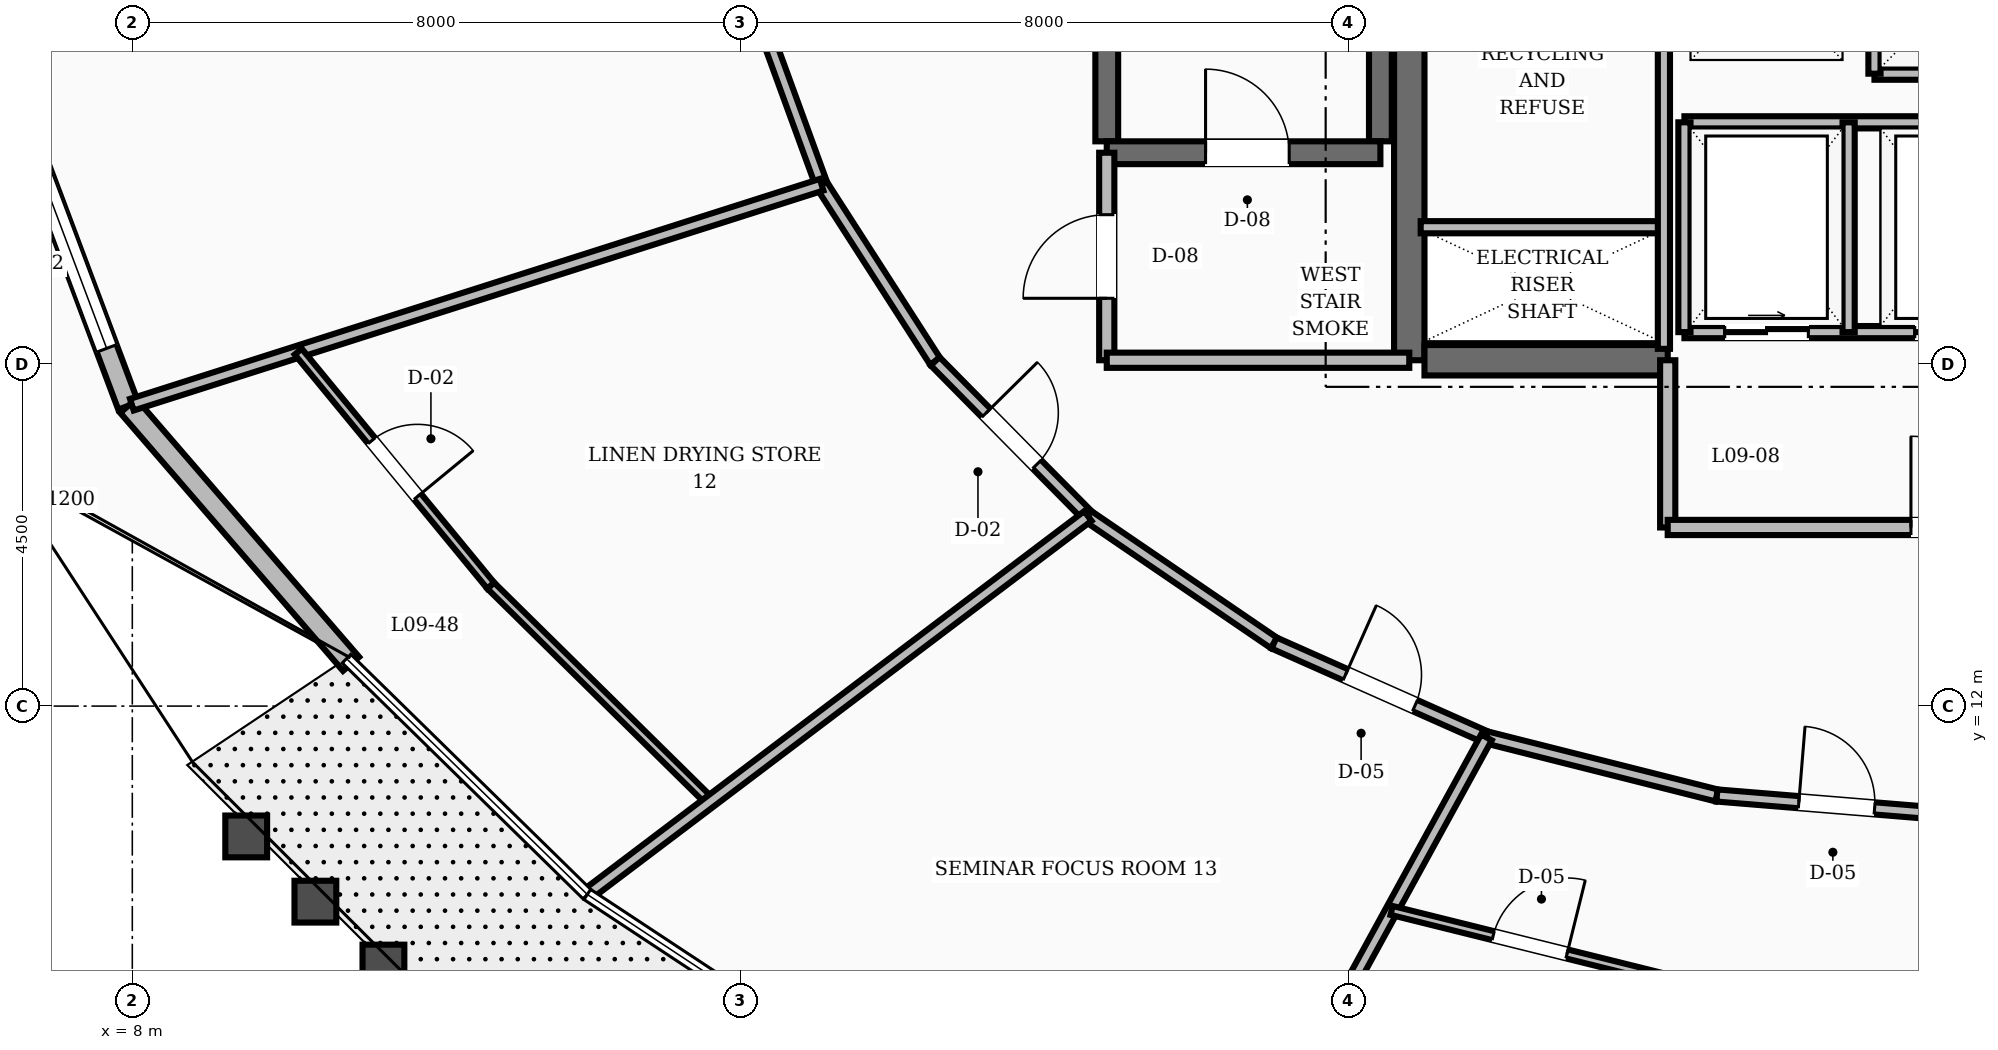
"""IFC4 building model, lengths in metres.
Left out: names, types, materials, properties, quantities, classifications, styles, units other than length and angle.
Written with IfcOpenShell. Run it as: python <this file> out.ifc"""

import sys

from ifc_helpers import new_model, si_unit, direction, frame, frame_2d, origin, place, context, subcontext, project, spatial, rectangle, extrude, element, fill, save


model = new_model("IFC4")
c1 = context("Model", 3, precision=1e-05, world=origin(), true_north=direction((0.0, 1.0)))
c2 = subcontext(c1, "Body", "Model", "MODEL_VIEW")
j1 = project(units=[si_unit("LENGTHUNIT", "METRE"), si_unit("PLANEANGLEUNIT", "RADIAN")], contexts=[c1])
p1 = place(None, origin())
s1 = spatial("IfcSite", under=j1, at=p1, CompositionType="ELEMENT")
p2 = place(p1, origin())
s2 = spatial("IfcBuilding", under=s1, at=p2, CompositionType="ELEMENT")
p3 = place(p2, frame((0.0, 0.0, 41.2)))
s3 = spatial("IfcBuildingStorey", under=s2, at=p3, CompositionType="ELEMENT", Elevation=41.2)
p4 = place(p3, frame((24.8, 16.55, 0.0), z_axis=(0.0, 0.0, 1.0), x_axis=(0.0, 1.0, 0.0)))
e1 = element("IfcWall", 1, at=p4, inside=s3, PredefinedType="SHEAR", context=c2, shape_type="SweptSolid", body=[
    extrude(rectangle(XDim=6.3, YDim=0.4, at=frame_2d((3.15, 0.0))), origin(), (0.0, 0.0, 1.0), 3.6),
])
p5 = place(p3, frame((25.0, 16.55, 0.0), z_axis=(0.0, 0.0, 1.0), x_axis=(1.0, 0.0, 0.0)))
e2 = element("IfcWall", 2, at=p5, inside=s3, PredefinedType="SHEAR", context=c2, shape_type="SweptSolid", body=[
    extrude(rectangle(XDim=3.2, YDim=0.4, at=frame_2d((1.6, 0.0))), origin(), (0.0, 0.0, 1.0), 3.6),
])
for number, where, z_axis, x_axis in (
    (3, (20.82, 19.43, 0.0), (0.0, 0.0, 1.0), (0.0, 1.0, 0.0)),
    (4, (24.42, 19.43, 0.0), (0.0, 0.0, 1.0), (0.0, 1.0, 0.0)),
):
    element("IfcWall", number, at=place(p3, frame(where, z_axis=z_axis, x_axis=x_axis)), inside=s3, PredefinedType="SHEAR", context=c2, shape_type="SweptSolid", body=[
        extrude(rectangle(XDim=8.74, YDim=0.3, at=frame_2d((4.37, 0.0))), origin(), (0.0, 0.0, 1.0), 3.6),
    ])
p6 = place(p3, frame((20.82, 19.28, 0.0), z_axis=(0.0, 0.0, 1.0), x_axis=(1.0, 0.0, 0.0)))
e5 = element("IfcWall", 5, at=p6, inside=s3, PredefinedType="SHEAR", context=c2, shape_type="SweptSolid", body=[
    extrude(rectangle(XDim=3.6, YDim=0.3, at=frame_2d((1.8, 0.0))), origin(), (0.0, 0.0, 1.0), 3.6),
])
p7 = place(p6, frame((1.3, 0.0, 0.0)))
e6 = element("IfcOpeningElement", 6, at=p7, cuts=e5, PredefinedType="OPENING", context=c2, shape_type="SweptSolid", body=[
    extrude(rectangle(XDim=1.1, YDim=2.1, at=frame_2d((0.55, 1.05))), frame((0.0, 0.16, 0.0), z_axis=(0.0, -1.0, 0.0), x_axis=(1.0, 0.0, 0.0)), (0.0, 0.0, 1.0), 0.32),
])
p8 = place(p3, frame((6.465, 19.896, 0.0), z_axis=(0.0, 0.0, 1.0), x_axis=(0.351472537915, -0.936198192207, 0.0)))
e7 = element("IfcWall", 7, at=p8, inside=s3, PredefinedType="STANDARD", context=c2, shape_type="SweptSolid", body=[
    extrude(rectangle(XDim=4.215, YDim=0.28, at=frame_2d((2.107, 0.0))), origin(), (0.0, 0.0, 1.0), 2.65),
])
p9 = place(p8, frame((0.808, 0.0, 0.8)))
e8 = element("IfcOpeningElement", 8, at=p9, cuts=e7, PredefinedType="OPENING", context=c2, shape_type="SweptSolid", body=[
    extrude(rectangle(XDim=2.6, YDim=1.65, at=frame_2d((1.3, 0.825))), frame((0.0, 0.15, 0.0), z_axis=(0.0, -1.0, 0.0), x_axis=(1.0, 0.0, 0.0)), (0.0, 0.0, 1.0), 0.3),
])
p10 = place(p3, frame((7.946, 15.95, 0.0), z_axis=(0.0, 0.0, 1.0), x_axis=(0.653570276047, -0.756865836372, 0.0)))
e9 = element("IfcWall", 9, at=p10, inside=s3, PredefinedType="STANDARD", context=c2, shape_type="SweptSolid", body=[
    extrude(rectangle(XDim=4.486, YDim=0.28, at=frame_2d((2.243, 0.0))), origin(), (0.0, 0.0, 1.0), 2.65),
])
p11 = place(p3, frame((20.82, 16.55, 0.0), z_axis=(0.0, 0.0, 1.0), x_axis=(0.0, 1.0, 0.0)))
e10 = element("IfcWall", 10, at=p11, inside=s3, PredefinedType="SOLIDWALL", context=c2, shape_type="SweptSolid", body=[
    extrude(rectangle(XDim=2.73, YDim=0.2, at=frame_2d((1.365, 0.0))), origin(), (0.0, 0.0, 1.0), 2.61),
])
p12 = place(p11, frame((0.815, 0.0, 0.0)))
e11 = element("IfcOpeningElement", 11, at=p12, cuts=e10, PredefinedType="OPENING", context=c2, shape_type="SweptSolid", body=[
    extrude(rectangle(XDim=1.1, YDim=2.1, at=frame_2d((0.55, 1.05))), frame((0.0, 0.11, 0.0), z_axis=(0.0, -1.0, 0.0), x_axis=(1.0, 0.0, 0.0)), (0.0, 0.0, 1.0), 0.22),
])
p13 = place(p3, frame((20.82, 16.55, 0.0), z_axis=(0.0, 0.0, 1.0), x_axis=(1.0, 0.0, 0.0)))
e12 = element("IfcWall", 12, at=p13, inside=s3, PredefinedType="SOLIDWALL", context=c2, shape_type="SweptSolid", body=[
    extrude(rectangle(XDim=3.98, YDim=0.2, at=frame_2d((1.99, 0.0))), origin(), (0.0, 0.0, 1.0), 2.61),
])
p14 = place(p3, frame((28.2, 14.35, 0.0), z_axis=(0.0, 0.0, 1.0), x_axis=(0.0, 1.0, 0.0)))
e13 = element("IfcWall", 13, at=p14, inside=s3, PredefinedType="SOLIDWALL", context=c2, shape_type="SweptSolid", body=[
    extrude(rectangle(XDim=2.2, YDim=0.2, at=frame_2d((1.1, 0.0))), origin(), (0.0, 0.0, 1.0), 2.61),
])
p15 = place(p3, frame((28.2, 14.35, 0.0), z_axis=(0.0, 0.0, 1.0), x_axis=(1.0, 0.0, 0.0)))
e14 = element("IfcWall", 14, at=p15, inside=s3, PredefinedType="SOLIDWALL", context=c2, shape_type="SweptSolid", body=[
    extrude(rectangle(XDim=7.6, YDim=0.2, at=frame_2d((3.8, 0.0))), origin(), (0.0, 0.0, 1.0), 2.61),
])
p16 = place(p15, frame((3.2, 0.0, 0.0)))
e15 = element("IfcOpeningElement", 15, at=p16, cuts=e14, PredefinedType="OPENING", context=c2, shape_type="SweptSolid", body=[
    extrude(rectangle(XDim=1.2, YDim=2.1, at=frame_2d((0.6, 1.05))), frame((0.0, 0.11, 0.0), z_axis=(0.0, -1.0, 0.0), x_axis=(1.0, 0.0, 0.0)), (0.0, 0.0, 1.0), 0.22),
])
p17 = place(p3, frame((30.92, 20.32, 0.0), z_axis=(0.0, 0.0, 1.0), x_axis=(1.0, 0.0, 0.0)))
e16 = element("IfcWall", 16, at=p17, inside=s3, PredefinedType="SOLIDWALL", context=c2, shape_type="SweptSolid", body=[
    extrude(rectangle(XDim=4.76, YDim=0.16, at=frame_2d((2.38, 0.0))), origin(), (0.0, 0.0, 1.0), 2.61),
])
p18 = place(p3, frame((30.92, 20.32, 0.0), z_axis=(0.0, 0.0, 1.0), x_axis=(0.0, 1.0, 0.0)))
e17 = element("IfcWall", 17, at=p18, inside=s3, PredefinedType="SOLIDWALL", context=c2, shape_type="SweptSolid", body=[
    extrude(rectangle(XDim=2.36, YDim=0.16, at=frame_2d((1.18, 0.0))), origin(), (0.0, 0.0, 1.0), 2.61),
])
p19 = place(p3, frame((28.42, 16.92, 0.0), z_axis=(0.0, 0.0, 1.0), x_axis=(1.0, 0.0, 0.0)))
e18 = element("IfcWall", 18, at=p19, inside=s3, PredefinedType="SOLIDWALL", context=c2, shape_type="SweptSolid", body=[
    extrude(rectangle(XDim=7.16, YDim=0.16, at=frame_2d((3.58, 0.0))), origin(), (0.0, 0.0, 1.0), 2.61),
])
p20 = place(p19, frame((0.53, 0.0, 0.0)))
e19 = element("IfcOpeningElement", 19, at=p20, cuts=e18, PredefinedType="OPENING", context=c2, shape_type="SweptSolid", body=[
    extrude(rectangle(XDim=1.1, YDim=2.15, at=frame_2d((0.55, 1.075))), frame((0.0, 0.09, 0.0), z_axis=(0.0, -1.0, 0.0), x_axis=(1.0, 0.0, 0.0)), (0.0, 0.0, 1.0), 0.18),
])
p21 = place(p19, frame((3.03, 0.0, 0.0)))
e20 = element("IfcOpeningElement", 20, at=p21, cuts=e18, PredefinedType="OPENING", context=c2, shape_type="SweptSolid", body=[
    extrude(rectangle(XDim=1.1, YDim=2.15, at=frame_2d((0.55, 1.075))), frame((0.0, 0.09, 0.0), z_axis=(0.0, -1.0, 0.0), x_axis=(1.0, 0.0, 0.0)), (0.0, 0.0, 1.0), 0.18),
])
p22 = place(p19, frame((5.53, 0.0, 0.0)))
e21 = element("IfcOpeningElement", 21, at=p22, cuts=e18, PredefinedType="OPENING", context=c2, shape_type="SweptSolid", body=[
    extrude(rectangle(XDim=1.1, YDim=2.15, at=frame_2d((0.55, 1.075))), frame((0.0, 0.09, 0.0), z_axis=(0.0, -1.0, 0.0), x_axis=(1.0, 0.0, 0.0)), (0.0, 0.0, 1.0), 0.18),
])
p23 = place(p3, frame((28.42, 19.68, 0.0), z_axis=(0.0, 0.0, 1.0), x_axis=(1.0, 0.0, 0.0)))
e22 = element("IfcWall", 22, at=p23, inside=s3, PredefinedType="SOLIDWALL", context=c2, shape_type="SweptSolid", body=[
    extrude(rectangle(XDim=7.16, YDim=0.16, at=frame_2d((3.58, 0.0))), origin(), (0.0, 0.0, 1.0), 2.61),
])
for number, where, z_axis, x_axis in (
    (23, (28.42, 16.92, 0.0), (0.0, 0.0, 1.0), (0.0, 1.0, 0.0)),
    (24, (30.58, 16.92, 0.0), (0.0, 0.0, 1.0), (0.0, 1.0, 0.0)),
):
    element("IfcWall", number, at=place(p3, frame(where, z_axis=z_axis, x_axis=x_axis)), inside=s3, PredefinedType="SOLIDWALL", context=c2, shape_type="SweptSolid", body=[
        extrude(rectangle(XDim=2.76, YDim=0.16, at=frame_2d((1.38, 0.0))), origin(), (0.0, 0.0, 1.0), 2.61),
    ])
p24 = place(p3, frame((24.95, 18.3, 0.0), z_axis=(0.0, 0.0, 1.0), x_axis=(1.0, 0.0, 0.0)))
e25 = element("IfcWall", 25, at=p24, inside=s3, PredefinedType="SOLIDWALL", context=c2, shape_type="SweptSolid", body=[
    extrude(rectangle(XDim=3.2, YDim=0.16, at=frame_2d((1.6, 0.0))), origin(), (0.0, 0.0, 1.0), 2.61),
])
p25 = place(p3, frame((28.15, 16.7, 0.0), z_axis=(0.0, 0.0, 1.0), x_axis=(0.0, 1.0, 0.0)))
e26 = element("IfcWall", 26, at=p25, inside=s3, PredefinedType="SOLIDWALL", context=c2, shape_type="SweptSolid", body=[
    extrude(rectangle(XDim=6.05, YDim=0.16, at=frame_2d((3.025, 0.0))), origin(), (0.0, 0.0, 1.0), 2.61),
])
p26 = place(p3, frame((16.148, 21.379, 0.0), z_axis=(0.0, 0.0, 1.0), x_axis=(0.342882618672, -0.939378257047, 0.0)))
e27 = element("IfcWall", 27, at=p26, inside=s3, PredefinedType="SOLIDWALL", context=c2, shape_type="SweptSolid", body=[
    extrude(rectangle(XDim=2.683, YDim=0.16, at=frame_2d((1.341, 0.0))), origin(), (0.0, 0.0, 1.0), 2.61),
])
p27 = place(p3, frame((17.068, 18.859, 0.0), z_axis=(0.0, 0.0, 1.0), x_axis=(0.540891657444, -0.841092274907, 0.0)))
e28 = element("IfcWall", 28, at=p27, inside=s3, PredefinedType="SOLIDWALL", context=c2, shape_type="SweptSolid", body=[
    extrude(rectangle(XDim=2.761, YDim=0.16, at=frame_2d((1.38, 0.0))), origin(), (0.0, 0.0, 1.0), 2.61),
])
p28 = place(p3, frame((18.562, 16.537, 0.0), z_axis=(0.0, 0.0, 1.0), x_axis=(0.702569520063, -0.711615113301, 0.0)))
e29 = element("IfcWall", 29, at=p28, inside=s3, PredefinedType="SOLIDWALL", context=c2, shape_type="SweptSolid", body=[
    extrude(rectangle(XDim=2.861, YDim=0.16, at=frame_2d((1.43, 0.0))), origin(), (0.0, 0.0, 1.0), 2.61),
])
p29 = place(p28, frame((0.955, 0.0, 0.0)))
e30 = element("IfcOpeningElement", 30, at=p29, cuts=e29, PredefinedType="OPENING", context=c2, shape_type="SweptSolid", body=[
    extrude(rectangle(XDim=0.95, YDim=2.1, at=frame_2d((0.475, 1.05))), frame((0.0, 0.09, 0.0), z_axis=(0.0, -1.0, 0.0), x_axis=(1.0, 0.0, 0.0)), (0.0, 0.0, 1.0), 0.18),
])
p30 = place(p3, frame((20.572, 14.501, 0.0), z_axis=(0.0, 0.0, 1.0), x_axis=(0.826112340767, -0.563505457323, 0.0)))
e31 = element("IfcWall", 31, at=p30, inside=s3, PredefinedType="SOLIDWALL", context=c2, shape_type="SweptSolid", body=[
    extrude(rectangle(XDim=2.965, YDim=0.16, at=frame_2d((1.482, 0.0))), origin(), (0.0, 0.0, 1.0), 2.61),
])
p31 = place(p3, frame((23.021, 12.83, 0.0), z_axis=(0.0, 0.0, 1.0), x_axis=(0.913860932409, -0.406027334321, 0.0)))
e32 = element("IfcWall", 32, at=p31, inside=s3, PredefinedType="SOLIDWALL", context=c2, shape_type="SweptSolid", body=[
    extrude(rectangle(XDim=3.058, YDim=0.16, at=frame_2d((1.529, 0.0))), origin(), (0.0, 0.0, 1.0), 2.61),
])
p32 = place(p31, frame((1.029, 0.0, 0.0)))
e33 = element("IfcOpeningElement", 33, at=p32, cuts=e32, PredefinedType="OPENING", context=c2, shape_type="SweptSolid", body=[
    extrude(rectangle(XDim=1.0, YDim=2.1, at=frame_2d((0.5, 1.05))), frame((0.0, 0.09, 0.0), z_axis=(0.0, -1.0, 0.0), x_axis=(1.0, 0.0, 0.0)), (0.0, 0.0, 1.0), 0.18),
])
p33 = place(p3, frame((25.815, 11.589, 0.0), z_axis=(0.0, 0.0, 1.0), x_axis=(0.969653665365, -0.244482656326, 0.0)))
e34 = element("IfcWall", 34, at=p33, inside=s3, PredefinedType="SOLIDWALL", context=c2, shape_type="SweptSolid", body=[
    extrude(rectangle(XDim=3.127, YDim=0.16, at=frame_2d((1.563, 0.0))), origin(), (0.0, 0.0, 1.0), 2.61),
])
p34 = place(p3, frame((28.847, 10.824, 0.0), z_axis=(0.0, 0.0, 1.0), x_axis=(0.996661331307, -0.081646743207, 0.0)))
e35 = element("IfcWall", 35, at=p34, inside=s3, PredefinedType="SOLIDWALL", context=c2, shape_type="SweptSolid", body=[
    extrude(rectangle(XDim=3.164, YDim=0.16, at=frame_2d((1.582, 0.0))), origin(), (0.0, 0.0, 1.0), 2.61),
])
p35 = place(p34, frame((1.082, 0.0, 0.0)))
e36 = element("IfcOpeningElement", 36, at=p35, cuts=e35, PredefinedType="OPENING", context=c2, shape_type="SweptSolid", body=[
    extrude(rectangle(XDim=1.0, YDim=2.1, at=frame_2d((0.5, 1.05))), frame((0.0, 0.09, 0.0), z_axis=(0.0, -1.0, 0.0), x_axis=(1.0, 0.0, 0.0)), (0.0, 0.0, 1.0), 0.18),
])
p36 = place(p3, frame((25.815, 11.589, 0.0), z_axis=(0.0, 0.0, 1.0), x_axis=(-0.48051126166, -0.876988556036, 0.0)))
e37 = element("IfcWall", 37, at=p36, inside=s3, PredefinedType="SOLIDWALL", context=c2, shape_type="SweptSolid", body=[
    extrude(rectangle(XDim=7.368, YDim=0.16, at=frame_2d((3.684, 0.0))), origin(), (0.0, 0.0, 1.0), 2.61),
])
p37 = place(p3, frame((24.568, 9.312, 0.0), z_axis=(0.0, 0.0, 1.0), x_axis=(0.970523829208, -0.241005180317, 0.0)))
e38 = element("IfcWall", 38, at=p37, inside=s3, PredefinedType="PARTITIONING", context=c2, shape_type="SweptSolid", body=[
    extrude(rectangle(XDim=3.754, YDim=0.12, at=frame_2d((1.877, 0.0))), origin(), (0.0, 0.0, 1.0), 2.61),
])
p38 = place(p37, frame((1.377, 0.0, 0.0)))
e39 = element("IfcOpeningElement", 39, at=p38, cuts=e38, PredefinedType="OPENING", context=c2, shape_type="SweptSolid", body=[
    extrude(rectangle(XDim=1.0, YDim=2.1, at=frame_2d((0.5, 1.05))), frame((0.0, 0.07, 0.0), z_axis=(0.0, -1.0, 0.0), x_axis=(1.0, 0.0, 0.0)), (0.0, 0.0, 1.0), 0.14),
])
p39 = place(p3, frame((17.068, 18.859, 0.0), z_axis=(0.0, 0.0, 1.0), x_axis=(-0.952736741366, -0.303797138978, 0.0)))
e40 = element("IfcWall", 40, at=p39, inside=s3, PredefinedType="SOLIDWALL", context=c2, shape_type="SweptSolid", body=[
    extrude(rectangle(XDim=9.525, YDim=0.16, at=frame_2d((4.762, 0.0))), origin(), (0.0, 0.0, 1.0), 2.61),
])
p40 = place(p3, frame((10.183, 16.663, 0.0), z_axis=(0.0, 0.0, 1.0), x_axis=(0.635342385708, -0.772230569793, 0.0)))
e41 = element("IfcWall", 41, at=p40, inside=s3, PredefinedType="PARTITIONING", context=c2, shape_type="SweptSolid", body=[
    extrude(rectangle(XDim=3.988, YDim=0.12, at=frame_2d((1.994, 0.0))), origin(), (0.0, 0.0, 1.0), 2.61),
])
p41 = place(p40, frame((1.519, 0.0, 0.0)))
e42 = element("IfcOpeningElement", 42, at=p41, cuts=e41, PredefinedType="OPENING", context=c2, shape_type="SweptSolid", body=[
    extrude(rectangle(XDim=0.95, YDim=2.1, at=frame_2d((0.475, 1.05))), frame((0.0, 0.07, 0.0), z_axis=(0.0, -1.0, 0.0), x_axis=(1.0, 0.0, 0.0)), (0.0, 0.0, 1.0), 0.14),
])
p42 = place(p3, frame((12.717, 13.584, 0.0), z_axis=(0.0, 0.0, 1.0), x_axis=(0.712363638045, -0.701810549358, 0.0)))
e43 = element("IfcWall", 43, at=p42, inside=s3, PredefinedType="PARTITIONING", context=c2, shape_type="SweptSolid", body=[
    extrude(rectangle(XDim=4.049, YDim=0.12, at=frame_2d((2.024, 0.0))), origin(), (0.0, 0.0, 1.0), 2.61),
])
p43 = place(p3, frame((20.572, 14.501, 0.0), z_axis=(0.0, 0.0, 1.0), x_axis=(-0.797684116535, -0.603075492976, 0.0)))
e44 = element("IfcWall", 44, at=p43, inside=s3, PredefinedType="SOLIDWALL", context=c2, shape_type="SweptSolid", body=[
    extrude(rectangle(XDim=8.206, YDim=0.16, at=frame_2d((4.103, 0.0))), origin(), (0.0, 0.0, 1.0), 2.61),
])
p44 = place(p9, origin())
e45 = element("IfcWindow", 45, at=p44, inside=s3, PartitioningType="SINGLE_PANEL", PredefinedType="WINDOW", context=c2, shape_type="SweptSolid", body=[
    extrude(rectangle(XDim=2.6, YDim=1.65, at=frame_2d((1.3, 0.825))), frame((0.0, 0.03, 0.0), z_axis=(0.0, -1.0, 0.0), x_axis=(1.0, 0.0, 0.0)), (0.0, 0.0, 1.0), 0.06),
])
fill(e8, e45)
p45 = place(p7, origin())
e46 = element("IfcDoor", 46, at=p45, inside=s3, OperationType="SINGLE_SWING_LEFT", PredefinedType="DOOR", context=c2, shape_type="SweptSolid", body=[
    extrude(rectangle(XDim=1.1, YDim=2.1, at=frame_2d((0.55, 1.05))), frame((0.0, 0.025, 0.0), z_axis=(0.0, -1.0, 0.0), x_axis=(1.0, 0.0, 0.0)), (0.0, 0.0, 1.0), 0.05),
])
fill(e6, e46)
p46 = place(p12, origin())
e47 = element("IfcDoor", 47, at=p46, inside=s3, OperationType="SINGLE_SWING_LEFT", PredefinedType="DOOR", context=c2, shape_type="SweptSolid", body=[
    extrude(rectangle(XDim=1.1, YDim=2.1, at=frame_2d((0.55, 1.05))), frame((0.0, 0.025, 0.0), z_axis=(0.0, -1.0, 0.0), x_axis=(1.0, 0.0, 0.0)), (0.0, 0.0, 1.0), 0.05),
])
fill(e11, e47)
p47 = place(p16, origin())
e48 = element("IfcDoor", 48, at=p47, inside=s3, OperationType="SINGLE_SWING_LEFT", PredefinedType="DOOR", context=c2, shape_type="SweptSolid", body=[
    extrude(rectangle(XDim=1.2, YDim=2.1, at=frame_2d((0.6, 1.05))), frame((0.0, 0.025, 0.0), z_axis=(0.0, -1.0, 0.0), x_axis=(1.0, 0.0, 0.0)), (0.0, 0.0, 1.0), 0.05),
])
fill(e15, e48)
p48 = place(p20, origin())
e49 = element("IfcDoor", 49, at=p48, inside=s3, OperationType="SLIDING_TO_RIGHT", PredefinedType="DOOR", context=c2, shape_type="SweptSolid", body=[
    extrude(rectangle(XDim=1.1, YDim=2.15, at=frame_2d((0.55, 1.075))), frame((0.0, 0.025, 0.0), z_axis=(0.0, -1.0, 0.0), x_axis=(1.0, 0.0, 0.0)), (0.0, 0.0, 1.0), 0.05),
])
fill(e19, e49)
p49 = place(p21, origin())
e50 = element("IfcDoor", 50, at=p49, inside=s3, OperationType="SLIDING_TO_RIGHT", PredefinedType="DOOR", context=c2, shape_type="SweptSolid", body=[
    extrude(rectangle(XDim=1.1, YDim=2.15, at=frame_2d((0.55, 1.075))), frame((0.0, 0.025, 0.0), z_axis=(0.0, -1.0, 0.0), x_axis=(1.0, 0.0, 0.0)), (0.0, 0.0, 1.0), 0.05),
])
fill(e20, e50)
p50 = place(p35, origin())
e51 = element("IfcDoor", 51, at=p50, inside=s3, OperationType="SINGLE_SWING_LEFT", PredefinedType="DOOR", context=c2, shape_type="SweptSolid", body=[
    extrude(rectangle(XDim=1.0, YDim=2.1, at=frame_2d((0.5, 1.05))), frame((0.0, 0.025, 0.0), z_axis=(0.0, -1.0, 0.0), x_axis=(1.0, 0.0, 0.0)), (0.0, 0.0, 1.0), 0.05),
])
fill(e36, e51)
p51 = place(p38, origin())
e52 = element("IfcDoor", 52, at=p51, inside=s3, OperationType="SINGLE_SWING_RIGHT", PredefinedType="DOOR", context=c2, shape_type="SweptSolid", body=[
    extrude(rectangle(XDim=1.0, YDim=2.1, at=frame_2d((0.5, 1.05))), frame((0.0, 0.025, 0.0), z_axis=(0.0, -1.0, 0.0), x_axis=(1.0, 0.0, 0.0)), (0.0, 0.0, 1.0), 0.05),
])
fill(e39, e52)
p52 = place(p29, origin())
e53 = element("IfcDoor", 53, at=p52, inside=s3, OperationType="SINGLE_SWING_LEFT", PredefinedType="DOOR", context=c2, shape_type="SweptSolid", body=[
    extrude(rectangle(XDim=0.95, YDim=2.1, at=frame_2d((0.475, 1.05))), frame((0.0, 0.025, 0.0), z_axis=(0.0, -1.0, 0.0), x_axis=(1.0, 0.0, 0.0)), (0.0, 0.0, 1.0), 0.05),
])
fill(e30, e53)
p53 = place(p41, origin())
e54 = element("IfcDoor", 54, at=p53, inside=s3, OperationType="SINGLE_SWING_RIGHT", PredefinedType="DOOR", context=c2, shape_type="SweptSolid", body=[
    extrude(rectangle(XDim=0.95, YDim=2.1, at=frame_2d((0.475, 1.05))), frame((0.0, 0.025, 0.0), z_axis=(0.0, -1.0, 0.0), x_axis=(1.0, 0.0, 0.0)), (0.0, 0.0, 1.0), 0.05),
])
fill(e42, e54)
p54 = place(p32, origin())
e55 = element("IfcDoor", 55, at=p54, inside=s3, OperationType="SINGLE_SWING_LEFT", PredefinedType="DOOR", context=c2, shape_type="SweptSolid", body=[
    extrude(rectangle(XDim=1.0, YDim=2.1, at=frame_2d((0.5, 1.05))), frame((0.0, 0.025, 0.0), z_axis=(0.0, -1.0, 0.0), x_axis=(1.0, 0.0, 0.0)), (0.0, 0.0, 1.0), 0.05),
])
fill(e33, e55)
save(model, sys.argv[1])
